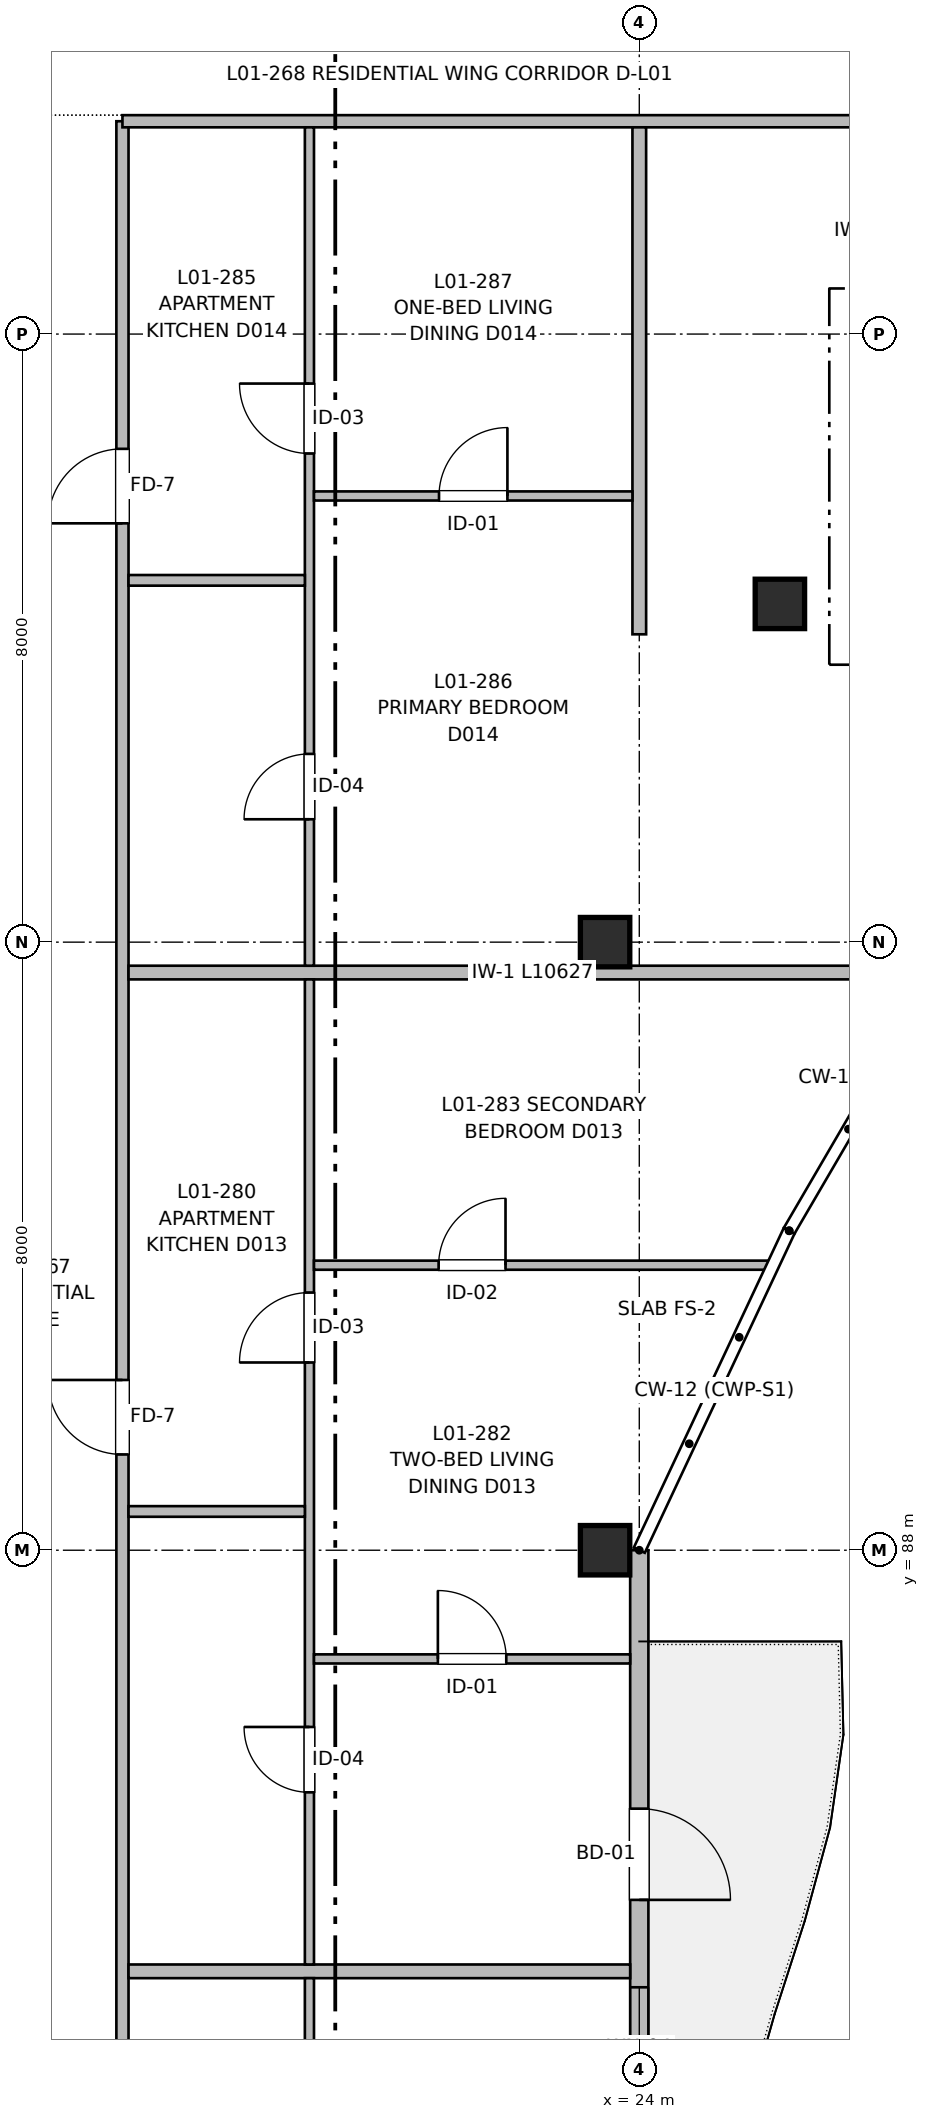
"""IFC4 building model, lengths in metres.
Left out: names, types, materials, properties, quantities, classifications, styles, units other than length and angle.
Written with IfcOpenShell. Run it as: python <this file> out.ifc"""

import sys

from ifc_helpers import new_model, si_unit, direction, frame, frame_2d, origin, origin_2d, place, context, subcontext, project, spatial, rectangle, extrude, element, fill, save


model = new_model("IFC4")
c1 = context("Model", 3, precision=1e-05, world=origin(), true_north=direction((0.0, 1.0)))
c2 = subcontext(c1, "Body", "Model", "MODEL_VIEW")
j1 = project(units=[si_unit("LENGTHUNIT", "METRE"), si_unit("PLANEANGLEUNIT", "RADIAN")], contexts=[c1])
p1 = place(None, origin())
s1 = spatial("IfcSite", under=j1, at=p1, CompositionType="ELEMENT")
p2 = place(p1, origin())
s2 = spatial("IfcBuilding", under=s1, at=p2, CompositionType="ELEMENT")
p3 = place(p2, frame((0.0, 0.0, 4.16)))
s3 = spatial("IfcBuildingStorey", under=s2, at=p3, CompositionType="ELEMENT", Elevation=4.16)
for number, where, z_axis, x_axis in (
    (1, (23.55, 88.0, 0.0), (0.0, 0.0, 1.0), (1.0, 0.0, 0.0)),
    (2, (23.55, 96.0, 0.0), (0.0, 0.0, 1.0), (1.0, 0.0, 0.0)),
    (3, (25.85, 100.45, 0.0), (0.0, 0.0, 1.0), (1.0, 0.0, 0.0)),
):
    element("IfcColumn", number, at=place(p3, frame(where, z_axis=z_axis, x_axis=x_axis)), inside=s3, PredefinedType="COLUMN", context=c2, shape_type="SweptSolid", body=[
        extrude(rectangle(XDim=0.65, YDim=0.65, at=origin_2d()), origin(), (0.0, 0.0, 1.0), 3.2),
    ])
p4 = place(p3, frame((24.0, 88.0, 0.0), z_axis=(0.0, 0.0, 1.0), x_axis=(0.0, -1.0, 0.0)))
e4 = element("IfcWall", 4, at=p4, inside=s3, PredefinedType="SOLIDWALL", context=c2, shape_type="SweptSolid", body=[
    extrude(rectangle(XDim=32.0, YDim=0.24, at=frame_2d((16.0, 0.0))), origin(), (0.0, 0.0, 1.0), 2.98),
])
p5 = place(p4, frame((3.4, 0.0, 0.0)))
e5 = element("IfcOpeningElement", 5, at=p5, cuts=e4, PredefinedType="OPENING", context=c2, shape_type="SweptSolid", body=[
    extrude(rectangle(XDim=1.2, YDim=2.2, at=frame_2d((0.6, 1.1))), frame((0.0, 0.13, 0.0), z_axis=(0.0, -1.0, 0.0), x_axis=(1.0, 0.0, 0.0)), (0.0, 0.0, 1.0), 0.26),
])
p6 = place(p4, frame((5.75, 0.0, 0.77)))
e6 = element("IfcOpeningElement", 6, at=p6, cuts=e4, PredefinedType="OPENING", context=c2, shape_type="SweptSolid", body=[
    extrude(rectangle(XDim=1.6, YDim=1.45, at=frame_2d((0.8, 0.725))), frame((0.0, 0.13, 0.0), z_axis=(0.0, -1.0, 0.0), x_axis=(1.0, 0.0, 0.0)), (0.0, 0.0, 1.0), 0.26),
])
p7 = place(p4, frame((11.2, 0.0, 0.77)))
e7 = element("IfcOpeningElement", 7, at=p7, cuts=e4, PredefinedType="OPENING", context=c2, shape_type="SweptSolid", body=[
    extrude(rectangle(XDim=1.6, YDim=1.45, at=frame_2d((0.8, 0.725))), frame((0.0, 0.13, 0.0), z_axis=(0.0, -1.0, 0.0), x_axis=(1.0, 0.0, 0.0)), (0.0, 0.0, 1.0), 0.26),
])
p8 = place(p4, frame((20.1, 0.0, 0.72)))
e8 = element("IfcOpeningElement", 8, at=p8, cuts=e4, PredefinedType="OPENING", context=c2, shape_type="SweptSolid", body=[
    extrude(rectangle(XDim=2.4, YDim=1.5, at=frame_2d((1.2, 0.75))), frame((0.0, 0.13, 0.0), z_axis=(0.0, -1.0, 0.0), x_axis=(1.0, 0.0, 0.0)), (0.0, 0.0, 1.0), 0.26),
])
p9 = place(p4, frame((27.25, 0.0, 0.82)))
e9 = element("IfcOpeningElement", 9, at=p9, cuts=e4, PredefinedType="OPENING", context=c2, shape_type="SweptSolid", body=[
    extrude(rectangle(XDim=1.5, YDim=1.4, at=frame_2d((0.75, 0.7))), frame((0.0, 0.13, 0.0), z_axis=(0.0, -1.0, 0.0), x_axis=(1.0, 0.0, 0.0)), (0.0, 0.0, 1.0), 0.26),
])
p10 = place(p4, frame((16.71, 0.0, 0.82)))
e10 = element("IfcOpeningElement", 10, at=p10, cuts=e4, PredefinedType="OPENING", context=c2, shape_type="SweptSolid", body=[
    extrude(rectangle(XDim=1.5, YDim=1.4, at=frame_2d((0.75, 0.7))), frame((0.0, 0.13, 0.0), z_axis=(0.0, -1.0, 0.0), x_axis=(1.0, 0.0, 0.0)), (0.0, 0.0, 1.0), 0.26),
])
p11 = place(p3, frame((17.2, 56.18, 0.0), z_axis=(0.0, 0.0, 1.0), x_axis=(0.0, 1.0, 0.0)))
e11 = element("IfcWall", 11, at=p11, inside=s3, PredefinedType="PARTITIONING", context=c2, shape_type="SweptSolid", body=[
    extrude(rectangle(XDim=50.62, YDim=0.16, at=frame_2d((25.31, 0.0))), origin(), (0.0, 0.0, 1.0), 2.935),
])
p12 = place(p11, frame((6.29, 0.0, 0.0)))
e12 = element("IfcOpeningElement", 12, at=p12, cuts=e11, PredefinedType="OPENING", context=c2, shape_type="SweptSolid", body=[
    extrude(rectangle(XDim=0.98, YDim=2.15, at=frame_2d((0.49, 1.075))), frame((0.0, 0.09, 0.0), z_axis=(0.0, -1.0, 0.0), x_axis=(1.0, 0.0, 0.0)), (0.0, 0.0, 1.0), 0.18),
])
p13 = place(p11, frame((19.4, 0.0, 0.0)))
e13 = element("IfcOpeningElement", 13, at=p13, cuts=e11, PredefinedType="OPENING", context=c2, shape_type="SweptSolid", body=[
    extrude(rectangle(XDim=1.02, YDim=2.15, at=frame_2d((0.51, 1.075))), frame((0.0, 0.09, 0.0), z_axis=(0.0, -1.0, 0.0), x_axis=(1.0, 0.0, 0.0)), (0.0, 0.0, 1.0), 0.18),
])
p14 = place(p11, frame((33.08, 0.0, 0.0)))
e14 = element("IfcOpeningElement", 14, at=p14, cuts=e11, PredefinedType="OPENING", context=c2, shape_type="SweptSolid", body=[
    extrude(rectangle(XDim=0.98, YDim=2.15, at=frame_2d((0.49, 1.075))), frame((0.0, 0.09, 0.0), z_axis=(0.0, -1.0, 0.0), x_axis=(1.0, 0.0, 0.0)), (0.0, 0.0, 1.0), 0.18),
])
p15 = place(p11, frame((45.33, 0.0, 0.0)))
e15 = element("IfcOpeningElement", 15, at=p15, cuts=e11, PredefinedType="OPENING", context=c2, shape_type="SweptSolid", body=[
    extrude(rectangle(XDim=0.98, YDim=2.15, at=frame_2d((0.49, 1.075))), frame((0.0, 0.09, 0.0), z_axis=(0.0, -1.0, 0.0), x_axis=(1.0, 0.0, 0.0)), (0.0, 0.0, 1.0), 0.18),
])
p16 = place(p3, frame((17.2, 106.8, 0.0), z_axis=(0.0, 0.0, 1.0), x_axis=(1.0, 0.0, 0.0)))
e16 = element("IfcWall", 16, at=p16, inside=s3, PredefinedType="PARTITIONING", context=c2, shape_type="SweptSolid", body=[
    extrude(rectangle(XDim=17.62, YDim=0.16, at=frame_2d((8.81, 0.0))), origin(), (0.0, 0.0, 1.0), 2.935),
])
p17 = place(p16, frame((13.075, 0.0, 0.0)))
e17 = element("IfcOpeningElement", 17, at=p17, cuts=e16, PredefinedType="OPENING", context=c2, shape_type="SweptSolid", body=[
    extrude(rectangle(XDim=1.05, YDim=2.15, at=frame_2d((0.525, 1.075))), frame((0.0, 0.09, 0.0), z_axis=(0.0, -1.0, 0.0), x_axis=(1.0, 0.0, 0.0)), (0.0, 0.0, 1.0), 0.18),
])
p18 = place(p3, frame((24.0, 100.05, 0.0), z_axis=(0.0, 0.0, 1.0), x_axis=(0.0, 1.0, 0.0)))
e18 = element("IfcWall", 18, at=p18, inside=s3, PredefinedType="PARTITIONING", context=c2, shape_type="SweptSolid", body=[
    extrude(rectangle(XDim=6.67, YDim=0.18, at=frame_2d((3.335, 0.0))), origin(), (0.0, 0.0, 1.0), 2.935),
])
p19 = place(p3, frame((17.28, 82.46, 0.0), z_axis=(0.0, 0.0, 1.0), x_axis=(1.0, 0.0, 0.0)))
e19 = element("IfcWall", 19, at=p19, inside=s3, PredefinedType="PARTITIONING", context=c2, shape_type="SweptSolid", body=[
    extrude(rectangle(XDim=6.6, YDim=0.18, at=frame_2d((3.3, 0.0))), origin(), (0.0, 0.0, 1.0), 2.935),
])
p20 = place(p3, frame((17.28, 95.6, 0.0), z_axis=(0.0, 0.0, 1.0), x_axis=(1.0, 0.0, 0.0)))
e20 = element("IfcWall", 20, at=p20, inside=s3, PredefinedType="PARTITIONING", context=c2, shape_type="SweptSolid", body=[
    extrude(rectangle(XDim=10.627, YDim=0.18, at=frame_2d((5.314, 0.0))), origin(), (0.0, 0.0, 1.0), 2.935),
])
p21 = place(p3, frame((19.66, 68.4, 0.0), z_axis=(0.0, 0.0, 1.0), x_axis=(0.0, 1.0, 0.0)))
e21 = element("IfcWall", 21, at=p21, inside=s3, PredefinedType="PARTITIONING", context=c2, shape_type="SweptSolid", body=[
    extrude(rectangle(XDim=13.97, YDim=0.12, at=frame_2d((6.985, 0.0))), origin(), (0.0, 0.0, 1.0), 2.935),
])
p22 = place(p21, frame((2.443, 0.0, 0.0)))
e22 = element("IfcOpeningElement", 22, at=p22, cuts=e21, PredefinedType="OPENING", context=c2, shape_type="SweptSolid", body=[
    extrude(rectangle(XDim=0.94, YDim=2.1, at=frame_2d((0.47, 1.05))), frame((0.0, 0.07, 0.0), z_axis=(0.0, -1.0, 0.0), x_axis=(1.0, 0.0, 0.0)), (0.0, 0.0, 1.0), 0.14),
])
p23 = place(p21, frame((8.541, 0.0, 0.0)))
e23 = element("IfcOpeningElement", 23, at=p23, cuts=e21, PredefinedType="OPENING", context=c2, shape_type="SweptSolid", body=[
    extrude(rectangle(XDim=0.92, YDim=2.1, at=frame_2d((0.46, 1.05))), frame((0.0, 0.07, 0.0), z_axis=(0.0, -1.0, 0.0), x_axis=(1.0, 0.0, 0.0)), (0.0, 0.0, 1.0), 0.14),
])
p24 = place(p3, frame((19.66, 82.55, 0.0), z_axis=(0.0, 0.0, 1.0), x_axis=(0.0, 1.0, 0.0)))
e24 = element("IfcWall", 24, at=p24, inside=s3, PredefinedType="PARTITIONING", context=c2, shape_type="SweptSolid", body=[
    extrude(rectangle(XDim=12.96, YDim=0.12, at=frame_2d((6.48, 0.0))), origin(), (0.0, 0.0, 1.0), 2.935),
])
p25 = place(p24, frame((2.265, 0.0, 0.0)))
e25 = element("IfcOpeningElement", 25, at=p25, cuts=e24, PredefinedType="OPENING", context=c2, shape_type="SweptSolid", body=[
    extrude(rectangle(XDim=0.86, YDim=2.1, at=frame_2d((0.43, 1.05))), frame((0.0, 0.07, 0.0), z_axis=(0.0, -1.0, 0.0), x_axis=(1.0, 0.0, 0.0)), (0.0, 0.0, 1.0), 0.14),
])
p26 = place(p24, frame((7.92, 0.0, 0.0)))
e26 = element("IfcOpeningElement", 26, at=p26, cuts=e24, PredefinedType="OPENING", context=c2, shape_type="SweptSolid", body=[
    extrude(rectangle(XDim=0.92, YDim=2.1, at=frame_2d((0.46, 1.05))), frame((0.0, 0.07, 0.0), z_axis=(0.0, -1.0, 0.0), x_axis=(1.0, 0.0, 0.0)), (0.0, 0.0, 1.0), 0.14),
])
p27 = place(p3, frame((17.28, 88.51, 0.0), z_axis=(0.0, 0.0, 1.0), x_axis=(1.0, 0.0, 0.0)))
e27 = element("IfcWall", 27, at=p27, inside=s3, PredefinedType="PARTITIONING", context=c2, shape_type="SweptSolid", body=[
    extrude(rectangle(XDim=2.32, YDim=0.14, at=frame_2d((1.16, 0.0))), origin(), (0.0, 0.0, 1.0), 2.935),
])
p28 = place(p3, frame((19.72, 86.57, 0.0), z_axis=(0.0, 0.0, 1.0), x_axis=(1.0, 0.0, 0.0)))
e28 = element("IfcWall", 28, at=p28, inside=s3, PredefinedType="PARTITIONING", context=c2, shape_type="SweptSolid", body=[
    extrude(rectangle(XDim=4.16, YDim=0.12, at=frame_2d((2.08, 0.0))), origin(), (0.0, 0.0, 1.0), 2.935),
])
p29 = place(p28, frame((1.63, 0.0, 0.0)))
e29 = element("IfcOpeningElement", 29, at=p29, cuts=e28, PredefinedType="OPENING", context=c2, shape_type="SweptSolid", body=[
    extrude(rectangle(XDim=0.9, YDim=2.1, at=frame_2d((0.45, 1.05))), frame((0.0, 0.07, 0.0), z_axis=(0.0, -1.0, 0.0), x_axis=(1.0, 0.0, 0.0)), (0.0, 0.0, 1.0), 0.14),
])
p30 = place(p3, frame((19.72, 91.75, 0.0), z_axis=(0.0, 0.0, 1.0), x_axis=(1.0, 0.0, 0.0)))
e30 = element("IfcWall", 30, at=p30, inside=s3, PredefinedType="PARTITIONING", context=c2, shape_type="SweptSolid", body=[
    extrude(rectangle(XDim=5.995, YDim=0.12, at=frame_2d((2.998, 0.0))), origin(), (0.0, 0.0, 1.0), 2.935),
])
p31 = place(p30, frame((1.64, 0.0, 0.0)))
e31 = element("IfcOpeningElement", 31, at=p31, cuts=e30, PredefinedType="OPENING", context=c2, shape_type="SweptSolid", body=[
    extrude(rectangle(XDim=0.88, YDim=2.1, at=frame_2d((0.44, 1.05))), frame((0.0, 0.07, 0.0), z_axis=(0.0, -1.0, 0.0), x_axis=(1.0, 0.0, 0.0)), (0.0, 0.0, 1.0), 0.14),
])
p32 = place(p3, frame((19.66, 95.69, 0.0), z_axis=(0.0, 0.0, 1.0), x_axis=(0.0, 1.0, 0.0)))
e32 = element("IfcWall", 32, at=p32, inside=s3, PredefinedType="PARTITIONING", context=c2, shape_type="SweptSolid", body=[
    extrude(rectangle(XDim=11.03, YDim=0.12, at=frame_2d((5.515, 0.0))), origin(), (0.0, 0.0, 1.0), 2.935),
])
p33 = place(p32, frame((1.927, 0.0, 0.0)))
e33 = element("IfcOpeningElement", 33, at=p33, cuts=e32, PredefinedType="OPENING", context=c2, shape_type="SweptSolid", body=[
    extrude(rectangle(XDim=0.86, YDim=2.1, at=frame_2d((0.43, 1.05))), frame((0.0, 0.07, 0.0), z_axis=(0.0, -1.0, 0.0), x_axis=(1.0, 0.0, 0.0)), (0.0, 0.0, 1.0), 0.14),
])
p34 = place(p32, frame((6.739, 0.0, 0.0)))
e34 = element("IfcOpeningElement", 34, at=p34, cuts=e32, PredefinedType="OPENING", context=c2, shape_type="SweptSolid", body=[
    extrude(rectangle(XDim=0.92, YDim=2.1, at=frame_2d((0.46, 1.05))), frame((0.0, 0.07, 0.0), z_axis=(0.0, -1.0, 0.0), x_axis=(1.0, 0.0, 0.0)), (0.0, 0.0, 1.0), 0.14),
])
p35 = place(p3, frame((17.28, 100.76, 0.0), z_axis=(0.0, 0.0, 1.0), x_axis=(1.0, 0.0, 0.0)))
e35 = element("IfcWall", 35, at=p35, inside=s3, PredefinedType="PARTITIONING", context=c2, shape_type="SweptSolid", body=[
    extrude(rectangle(XDim=2.32, YDim=0.14, at=frame_2d((1.16, 0.0))), origin(), (0.0, 0.0, 1.0), 2.935),
])
p36 = place(p3, frame((19.72, 101.87, 0.0), z_axis=(0.0, 0.0, 1.0), x_axis=(1.0, 0.0, 0.0)))
e36 = element("IfcWall", 36, at=p36, inside=s3, PredefinedType="PARTITIONING", context=c2, shape_type="SweptSolid", body=[
    extrude(rectangle(XDim=4.19, YDim=0.12, at=frame_2d((2.095, 0.0))), origin(), (0.0, 0.0, 1.0), 2.935),
])
p37 = place(p36, frame((1.645, 0.0, 0.0)))
e37 = element("IfcOpeningElement", 37, at=p37, cuts=e36, PredefinedType="OPENING", context=c2, shape_type="SweptSolid", body=[
    extrude(rectangle(XDim=0.9, YDim=2.1, at=frame_2d((0.45, 1.05))), frame((0.0, 0.07, 0.0), z_axis=(0.0, -1.0, 0.0), x_axis=(1.0, 0.0, 0.0)), (0.0, 0.0, 1.0), 0.14),
])
p38 = place(p5, origin())
e38 = element("IfcDoor", 38, at=p38, inside=s3, OperationType="SINGLE_SWING_RIGHT", PredefinedType="DOOR", context=c2, shape_type="SweptSolid", body=[
    extrude(rectangle(XDim=1.2, YDim=2.2, at=frame_2d((0.6, 1.1))), frame((0.0, 0.025, 0.0), z_axis=(0.0, -1.0, 0.0), x_axis=(1.0, 0.0, 0.0)), (0.0, 0.0, 1.0), 0.05),
])
fill(e5, e38)
p39 = place(p6, origin())
e39 = element("IfcWindow", 39, at=p39, inside=s3, PartitioningType="SINGLE_PANEL", PredefinedType="WINDOW", context=c2, shape_type="SweptSolid", body=[
    extrude(rectangle(XDim=1.6, YDim=1.45, at=frame_2d((0.8, 0.725))), frame((0.0, 0.03, 0.0), z_axis=(0.0, -1.0, 0.0), x_axis=(1.0, 0.0, 0.0)), (0.0, 0.0, 1.0), 0.06),
])
fill(e6, e39)
p40 = place(p25, origin())
e40 = element("IfcDoor", 40, at=p40, inside=s3, OperationType="SINGLE_SWING_RIGHT", PredefinedType="DOOR", context=c2, shape_type="SweptSolid", body=[
    extrude(rectangle(XDim=0.86, YDim=2.1, at=frame_2d((0.43, 1.05))), frame((0.0, 0.025, 0.0), z_axis=(0.0, -1.0, 0.0), x_axis=(1.0, 0.0, 0.0)), (0.0, 0.0, 1.0), 0.05),
])
fill(e25, e40)
p41 = place(p26, origin())
e41 = element("IfcDoor", 41, at=p41, inside=s3, OperationType="SINGLE_SWING_LEFT", PredefinedType="DOOR", context=c2, shape_type="SweptSolid", body=[
    extrude(rectangle(XDim=0.92, YDim=2.1, at=frame_2d((0.46, 1.05))), frame((0.0, 0.025, 0.0), z_axis=(0.0, -1.0, 0.0), x_axis=(1.0, 0.0, 0.0)), (0.0, 0.0, 1.0), 0.05),
])
fill(e26, e41)
p42 = place(p14, origin())
e42 = element("IfcDoor", 42, at=p42, inside=s3, OperationType="SINGLE_SWING_RIGHT", PredefinedType="DOOR", context=c2, shape_type="SweptSolid", body=[
    extrude(rectangle(XDim=0.98, YDim=2.15, at=frame_2d((0.49, 1.075))), frame((0.0, 0.025, 0.0), z_axis=(0.0, -1.0, 0.0), x_axis=(1.0, 0.0, 0.0)), (0.0, 0.0, 1.0), 0.05),
])
fill(e14, e42)
p43 = place(p29, origin())
e43 = element("IfcDoor", 43, at=p43, inside=s3, OperationType="SINGLE_SWING_LEFT", PredefinedType="DOOR", context=c2, shape_type="SweptSolid", body=[
    extrude(rectangle(XDim=0.9, YDim=2.1, at=frame_2d((0.45, 1.05))), frame((0.0, 0.025, 0.0), z_axis=(0.0, -1.0, 0.0), x_axis=(1.0, 0.0, 0.0)), (0.0, 0.0, 1.0), 0.05),
])
fill(e29, e43)
p44 = place(p31, origin())
e44 = element("IfcDoor", 44, at=p44, inside=s3, OperationType="SINGLE_SWING_RIGHT", PredefinedType="DOOR", context=c2, shape_type="SweptSolid", body=[
    extrude(rectangle(XDim=0.88, YDim=2.1, at=frame_2d((0.44, 1.05))), frame((0.0, 0.025, 0.0), z_axis=(0.0, -1.0, 0.0), x_axis=(1.0, 0.0, 0.0)), (0.0, 0.0, 1.0), 0.05),
])
fill(e31, e44)
p45 = place(p33, origin())
e45 = element("IfcDoor", 45, at=p45, inside=s3, OperationType="SINGLE_SWING_LEFT", PredefinedType="DOOR", context=c2, shape_type="SweptSolid", body=[
    extrude(rectangle(XDim=0.86, YDim=2.1, at=frame_2d((0.43, 1.05))), frame((0.0, 0.025, 0.0), z_axis=(0.0, -1.0, 0.0), x_axis=(1.0, 0.0, 0.0)), (0.0, 0.0, 1.0), 0.05),
])
fill(e33, e45)
p46 = place(p34, origin())
e46 = element("IfcDoor", 46, at=p46, inside=s3, OperationType="SINGLE_SWING_RIGHT", PredefinedType="DOOR", context=c2, shape_type="SweptSolid", body=[
    extrude(rectangle(XDim=0.92, YDim=2.1, at=frame_2d((0.46, 1.05))), frame((0.0, 0.025, 0.0), z_axis=(0.0, -1.0, 0.0), x_axis=(1.0, 0.0, 0.0)), (0.0, 0.0, 1.0), 0.05),
])
fill(e34, e46)
p47 = place(p15, origin())
e47 = element("IfcDoor", 47, at=p47, inside=s3, OperationType="SINGLE_SWING_LEFT", PredefinedType="DOOR", context=c2, shape_type="SweptSolid", body=[
    extrude(rectangle(XDim=0.98, YDim=2.15, at=frame_2d((0.49, 1.075))), frame((0.0, 0.025, 0.0), z_axis=(0.0, -1.0, 0.0), x_axis=(1.0, 0.0, 0.0)), (0.0, 0.0, 1.0), 0.05),
])
fill(e15, e47)
p48 = place(p37, origin())
e48 = element("IfcDoor", 48, at=p48, inside=s3, OperationType="SINGLE_SWING_RIGHT", PredefinedType="DOOR", context=c2, shape_type="SweptSolid", body=[
    extrude(rectangle(XDim=0.9, YDim=2.1, at=frame_2d((0.45, 1.05))), frame((0.0, 0.025, 0.0), z_axis=(0.0, -1.0, 0.0), x_axis=(1.0, 0.0, 0.0)), (0.0, 0.0, 1.0), 0.05),
])
fill(e37, e48)
save(model, sys.argv[1])
